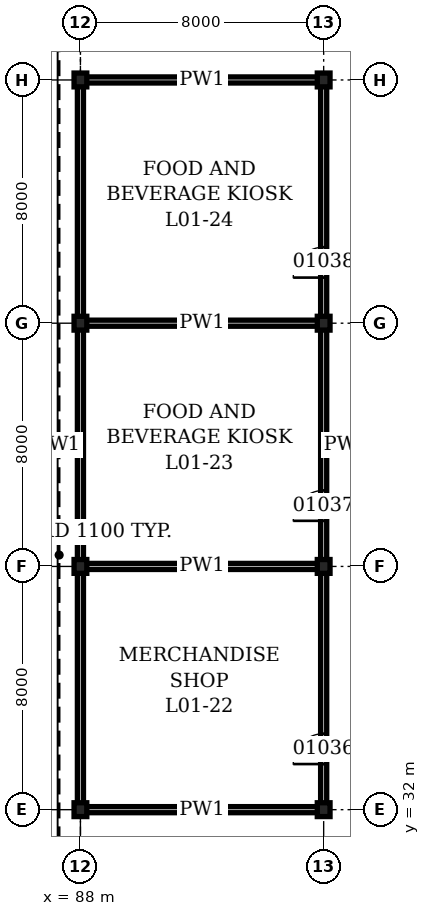
"""IFC4 building model, lengths in metres.
Left out: names, types, materials, properties, quantities, classifications, styles, units other than length and angle.
Written with IfcOpenShell. Run it as: python <this file> out.ifc"""

import sys

from ifc_helpers import new_model, si_unit, direction, frame, frame_2d, origin, origin_2d, place, context, subcontext, project, spatial, rectangle, i_section, extrude, element, fill, save


model = new_model("IFC4")
c1 = context("Model", 3, precision=1e-05, world=origin(), true_north=direction((0.0, 1.0)))
c2 = subcontext(c1, "Body", "Model", "MODEL_VIEW")
j1 = project(units=[si_unit("LENGTHUNIT", "METRE"), si_unit("PLANEANGLEUNIT", "RADIAN")], contexts=[c1])
p1 = place(None, origin())
s1 = spatial("IfcSite", under=j1, at=p1, CompositionType="ELEMENT")
p2 = place(p1, origin())
s2 = spatial("IfcBuilding", under=s1, at=p2, CompositionType="ELEMENT")
p3 = place(p2, frame((0.0, 0.0, 4.9)))
s3 = spatial("IfcBuildingStorey", under=s2, at=p3, CompositionType="ELEMENT", Elevation=4.9)
for number, where, z_axis, x_axis in (
    (1, (88.0, 32.0, 0.0), (0.0, 0.0, 1.0), (1.0, 0.0, 0.0)),
    (2, (88.0, 40.0, 0.0), (0.0, 0.0, 1.0), (1.0, 0.0, 0.0)),
    (3, (88.0, 48.0, 0.0), (0.0, 0.0, 1.0), (1.0, 0.0, 0.0)),
    (4, (88.0, 56.0, 0.0), (0.0, 0.0, 1.0), (1.0, 0.0, 0.0)),
    (5, (96.0, 32.0, 0.0), (0.0, 0.0, 1.0), (1.0, 0.0, 0.0)),
    (6, (96.0, 40.0, 0.0), (0.0, 0.0, 1.0), (1.0, 0.0, 0.0)),
    (7, (96.0, 48.0, 0.0), (0.0, 0.0, 1.0), (1.0, 0.0, 0.0)),
    (8, (96.0, 56.0, 0.0), (0.0, 0.0, 1.0), (1.0, 0.0, 0.0)),
):
    element("IfcColumn", number, at=place(p3, frame(where, z_axis=z_axis, x_axis=x_axis)), inside=s3, PredefinedType="COLUMN", context=c2, shape_type="SweptSolid", body=[
        extrude(i_section(OverallWidth=0.419, OverallDepth=0.455, WebThickness=0.042, FlangeThickness=0.068, at=origin_2d()), origin(), (0.0, 0.0, 1.0), 5.0),
    ])
for number, where, z_axis, x_axis in (
    (9, (88.1, 32.0, 0.0), (0.0, 0.0, 1.0), (1.0, 0.0, 0.0)),
    (10, (88.1, 40.0, 0.0), (0.0, 0.0, 1.0), (1.0, 0.0, 0.0)),
    (11, (88.1, 48.0, 0.0), (0.0, 0.0, 1.0), (1.0, 0.0, 0.0)),
    (12, (88.1, 56.0, 0.0), (0.0, 0.0, 1.0), (1.0, 0.0, 0.0)),
):
    element("IfcWall", number, at=place(p3, frame(where, z_axis=z_axis, x_axis=x_axis)), inside=s3, PredefinedType="PARTITIONING", context=c2, shape_type="SweptSolid", body=[
        extrude(rectangle(XDim=7.8, YDim=0.2, at=frame_2d((3.9, 0.0))), origin(), (0.0, 0.0, 1.0), 4.028),
    ])
p4 = place(p3, frame((88.0, 32.1, 0.0), z_axis=(0.0, 0.0, 1.0), x_axis=(0.0, 1.0, 0.0)))
e13 = element("IfcWall", 13, at=p4, inside=s3, PredefinedType="PARTITIONING", context=c2, shape_type="SweptSolid", body=[
    extrude(rectangle(XDim=23.8, YDim=0.2, at=frame_2d((11.9, 0.0))), origin(), (0.0, 0.0, 1.0), 4.028),
])
p5 = place(p3, frame((96.0, 32.1, 0.0), z_axis=(0.0, 0.0, 1.0), x_axis=(0.0, 1.0, 0.0)))
e14 = element("IfcWall", 14, at=p5, inside=s3, PredefinedType="PARTITIONING", context=c2, shape_type="SweptSolid", body=[
    extrude(rectangle(XDim=23.8, YDim=0.2, at=frame_2d((11.9, 0.0))), origin(), (0.0, 0.0, 1.0), 4.028),
])
p6 = place(p5, frame((1.4, 0.0, 0.0)))
e15 = element("IfcOpeningElement", 15, at=p6, cuts=e14, PredefinedType="OPENING", context=c2, shape_type="SweptSolid", body=[
    extrude(rectangle(XDim=1.0, YDim=2.1, at=frame_2d((0.5, 1.05))), frame((0.0, 0.11, 0.0), z_axis=(0.0, -1.0, 0.0), x_axis=(1.0, 0.0, 0.0)), (0.0, 0.0, 1.0), 0.22),
])
p7 = place(p5, frame((9.4, 0.0, 0.0)))
e16 = element("IfcOpeningElement", 16, at=p7, cuts=e14, PredefinedType="OPENING", context=c2, shape_type="SweptSolid", body=[
    extrude(rectangle(XDim=1.0, YDim=2.1, at=frame_2d((0.5, 1.05))), frame((0.0, 0.11, 0.0), z_axis=(0.0, -1.0, 0.0), x_axis=(1.0, 0.0, 0.0)), (0.0, 0.0, 1.0), 0.22),
])
p8 = place(p5, frame((17.4, 0.0, 0.0)))
e17 = element("IfcOpeningElement", 17, at=p8, cuts=e14, PredefinedType="OPENING", context=c2, shape_type="SweptSolid", body=[
    extrude(rectangle(XDim=1.0, YDim=2.1, at=frame_2d((0.5, 1.05))), frame((0.0, 0.11, 0.0), z_axis=(0.0, -1.0, 0.0), x_axis=(1.0, 0.0, 0.0)), (0.0, 0.0, 1.0), 0.22),
])
p9 = place(p6, origin())
e18 = element("IfcDoor", 18, at=p9, inside=s3, OperationType="SINGLE_SWING_LEFT", PredefinedType="DOOR", context=c2, shape_type="SweptSolid", body=[
    extrude(rectangle(XDim=1.0, YDim=2.1, at=frame_2d((0.5, 1.05))), frame((0.0, 0.1, 0.0), z_axis=(0.0, -1.0, 0.0), x_axis=(1.0, 0.0, 0.0)), (0.0, 0.0, 1.0), 0.199),
])
fill(e15, e18)
p10 = place(p7, origin())
e19 = element("IfcDoor", 19, at=p10, inside=s3, OperationType="SINGLE_SWING_LEFT", PredefinedType="DOOR", context=c2, shape_type="SweptSolid", body=[
    extrude(rectangle(XDim=1.0, YDim=2.1, at=frame_2d((0.5, 1.05))), frame((0.0, 0.1, 0.0), z_axis=(0.0, -1.0, 0.0), x_axis=(1.0, 0.0, 0.0)), (0.0, 0.0, 1.0), 0.199),
])
fill(e16, e19)
p11 = place(p8, origin())
e20 = element("IfcDoor", 20, at=p11, inside=s3, OperationType="SINGLE_SWING_LEFT", PredefinedType="DOOR", context=c2, shape_type="SweptSolid", body=[
    extrude(rectangle(XDim=1.0, YDim=2.1, at=frame_2d((0.5, 1.05))), frame((0.0, 0.1, 0.0), z_axis=(0.0, -1.0, 0.0), x_axis=(1.0, 0.0, 0.0)), (0.0, 0.0, 1.0), 0.199),
])
fill(e17, e20)
save(model, sys.argv[1])
